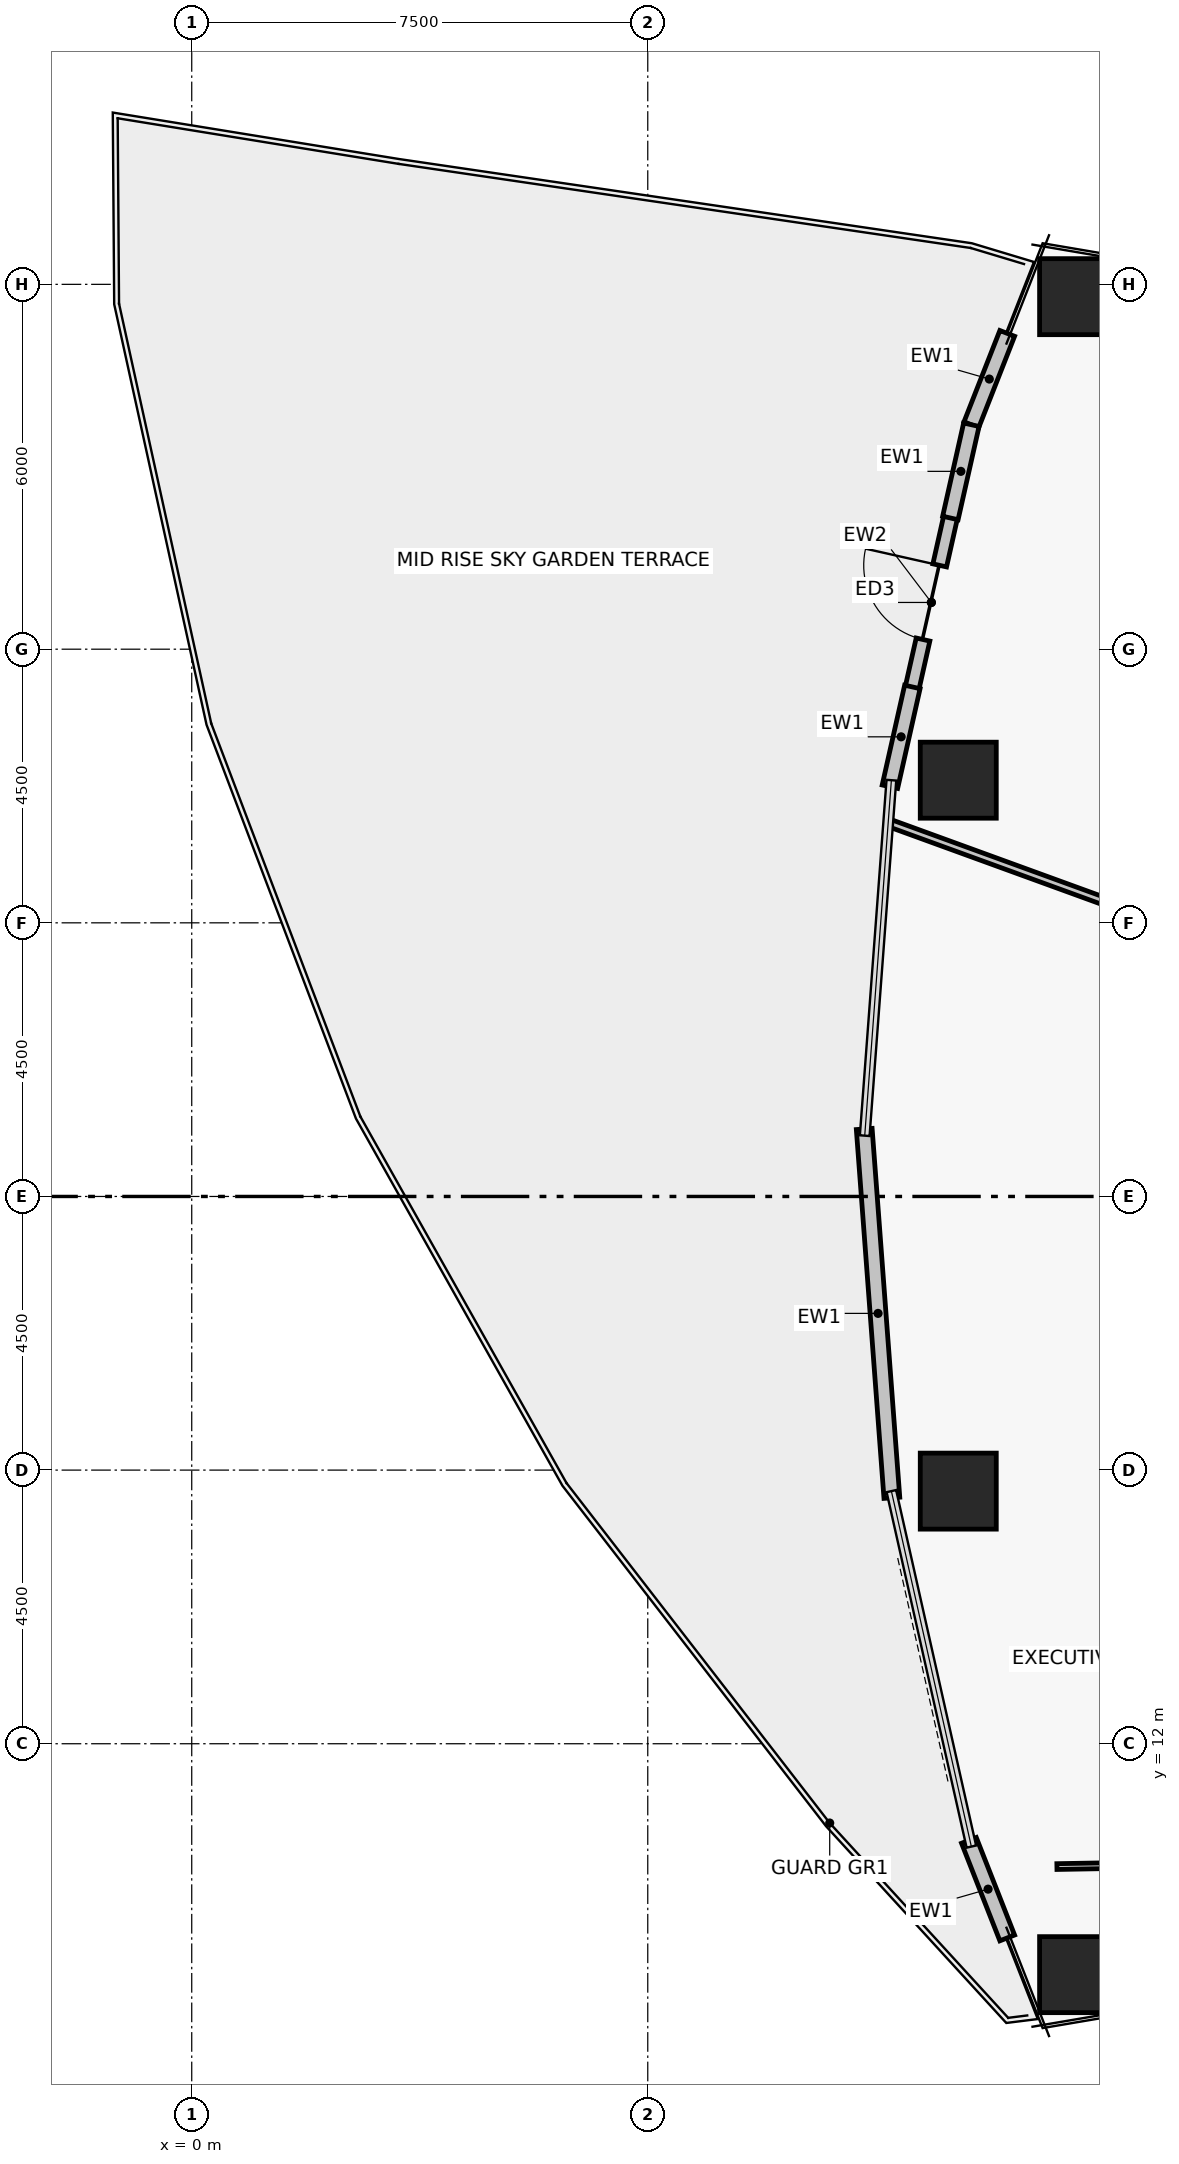
"""IFC4 building model, lengths in metres.
Left out: names, types, materials, properties, quantities, classifications, styles, units other than length and angle.
Written with IfcOpenShell. Run it as: python <this file> out.ifc"""

import sys

from ifc_helpers import new_model, si_unit, direction, frame, frame_2d, origin, origin_2d, place, context, subcontext, project, spatial, rectangle, hollow_rectangle, extrude, element, fill, save


model = new_model("IFC4")
c1 = context("Model", 3, precision=1e-05, world=origin(), true_north=direction((0.0, 1.0)))
c2 = subcontext(c1, "Body", "Model", "MODEL_VIEW")
j1 = project(units=[si_unit("LENGTHUNIT", "METRE"), si_unit("PLANEANGLEUNIT", "RADIAN")], contexts=[c1])
p1 = place(None, origin())
s1 = spatial("IfcSite", under=j1, at=p1, CompositionType="ELEMENT")
p2 = place(p1, origin())
s2 = spatial("IfcBuilding", under=s1, at=p2, CompositionType="ELEMENT")
p3 = place(p2, frame((0.0, 0.0, 118.86)))
s3 = spatial("IfcBuildingStorey", under=s2, at=p3, CompositionType="ELEMENT", Elevation=118.86)
for number, where, z_axis, x_axis in (
    (1, (14.569, 35.797, 0.0), (0.0, 0.0, 1.0), (1.0, 0.0, 0.0)),
    (2, (12.607, 27.846, 0.0), (0.0, 0.0, 1.0), (1.0, 0.0, 0.0)),
    (3, (12.607, 16.154, 0.0), (0.0, 0.0, 1.0), (1.0, 0.0, 0.0)),
    (4, (14.569, 8.203, 0.0), (0.0, 0.0, 1.0), (1.0, 0.0, 0.0)),
):
    element("IfcColumn", number, at=place(p3, frame(where, z_axis=z_axis, x_axis=x_axis)), inside=s3, PredefinedType="COLUMN", context=c2, shape_type="SweptSolid", body=[
        extrude(hollow_rectangle(XDim=1.25, YDim=1.25, WallThickness=0.05, at=origin_2d()), origin(), (0.0, 0.0, 1.0), 3.72),
    ])
p4 = place(p3, frame((11.849, 29.368, 0.0), z_axis=(0.0, 0.0, 1.0), x_axis=(0.219504103435, 0.975611576692, 0.0)))
e5 = element("IfcWall", 5, at=p4, inside=s3, PredefinedType="PARTITIONING", context=c2, shape_type="SweptSolid", body=[
    extrude(rectangle(XDim=2.872, YDim=0.23, at=frame_2d((1.436, 0.0))), origin(), (0.0, 0.0, 1.0), 3.47),
])
p5 = place(p4, frame((0.811, 0.0, 0.0)))
e6 = element("IfcOpeningElement", 6, at=p5, cuts=e5, PredefinedType="OPENING", context=c2, shape_type="SweptSolid", body=[
    extrude(rectangle(XDim=1.25, YDim=2.1, at=frame_2d((0.625, 1.05))), frame((0.0, 0.125, 0.0), z_axis=(0.0, -1.0, 0.0), x_axis=(1.0, 0.0, 0.0)), (0.0, 0.0, 1.0), 0.25),
])
p6 = place(p3, frame((12.822, 33.691, 0.0), z_axis=(0.0, 0.0, 1.0), x_axis=(0.365488551504, 0.930815835018, 0.0)))
e7 = element("IfcWall", 7, at=p6, inside=s3, PredefinedType="PARTITIONING", context=c2, shape_type="SweptSolid", body=[
    extrude(rectangle(XDim=1.614, YDim=0.26, at=frame_2d((0.807, 0.0))), origin(), (0.0, 0.0, 1.0), 3.47),
])
p7 = place(p3, frame((12.477, 32.158, 0.0), z_axis=(0.0, 0.0, 1.0), x_axis=(0.219593493325, 0.975591460443, 0.0)))
e8 = element("IfcWall", 8, at=p7, inside=s3, PredefinedType="PARTITIONING", context=c2, shape_type="SweptSolid", body=[
    extrude(rectangle(XDim=1.572, YDim=0.26, at=frame_2d((0.786, 0.0))), origin(), (0.0, 0.0, 1.0), 3.47),
])
p8 = place(p3, frame((11.482, 27.738, 0.0), z_axis=(0.0, 0.0, 1.0), x_axis=(0.219588171952, 0.975592658203, 0.0)))
e9 = element("IfcWall", 9, at=p8, inside=s3, PredefinedType="PARTITIONING", context=c2, shape_type="SweptSolid", body=[
    extrude(rectangle(XDim=1.682, YDim=0.26, at=frame_2d((0.841, 0.0))), origin(), (0.0, 0.0, 1.0), 3.47),
])
p9 = place(p3, frame((11.515, 16.045, 0.0), z_axis=(0.0, 0.0, 1.0), x_axis=(-0.074783960668, 0.997199758938, 0.0)))
e10 = element("IfcWall", 10, at=p9, inside=s3, PredefinedType="PARTITIONING", context=c2, shape_type="SweptSolid", body=[
    extrude(rectangle(XDim=6.082, YDim=0.26, at=frame_2d((3.041, 0.0))), origin(), (0.0, 0.0, 1.0), 3.47),
])
p10 = place(p3, frame((13.412, 8.806, 0.0), z_axis=(0.0, 0.0, 1.0), x_axis=(-0.365547203895, 0.930792802789, 0.0)))
e11 = element("IfcWall", 11, at=p10, inside=s3, PredefinedType="PARTITIONING", context=c2, shape_type="SweptSolid", body=[
    extrude(rectangle(XDim=1.724, YDim=0.26, at=frame_2d((0.862, 0.0))), origin(), (0.0, 0.0, 1.0), 3.47),
])
p11 = place(p3, frame((17.43, 24.974, 0.0), z_axis=(0.0, 0.0, 1.0), x_axis=(-0.939693782006, 0.342016952882, 0.0)))
e12 = element("IfcWall", 12, at=p11, inside=s3, PredefinedType="PARTITIONING", context=c2, shape_type="SweptSolid", body=[
    extrude(rectangle(XDim=6.369, YDim=0.125, at=frame_2d((3.185, 0.0))), origin(), (0.0, 0.0, 1.0), 2.6),
])
p12 = place(p3, frame((14.229, 9.98, 0.0), z_axis=(0.0, 0.0, 1.0), x_axis=(0.99984780162, 0.017446306083, 0.0)))
e13 = element("IfcWall", 13, at=p12, inside=s3, PredefinedType="PARTITIONING", context=c2, shape_type="SweptSolid", body=[
    extrude(rectangle(XDim=11.195, YDim=0.095, at=frame_2d((5.598, 0.0))), origin(), (0.0, 0.0, 1.0), 2.65),
])
p13 = place(p5, origin())
e14 = element("IfcDoor", 14, at=p13, inside=s3, OperationType="SINGLE_SWING_RIGHT", PredefinedType="DOOR", context=c2, shape_type="SweptSolid", body=[
    extrude(rectangle(XDim=1.25, YDim=2.1, at=frame_2d((0.625, 1.05))), frame((0.0, 0.025, 0.0), z_axis=(0.0, -1.0, 0.0), x_axis=(1.0, 0.0, 0.0)), (0.0, 0.0, 1.0), 0.05),
])
fill(e6, e14)
save(model, sys.argv[1])
